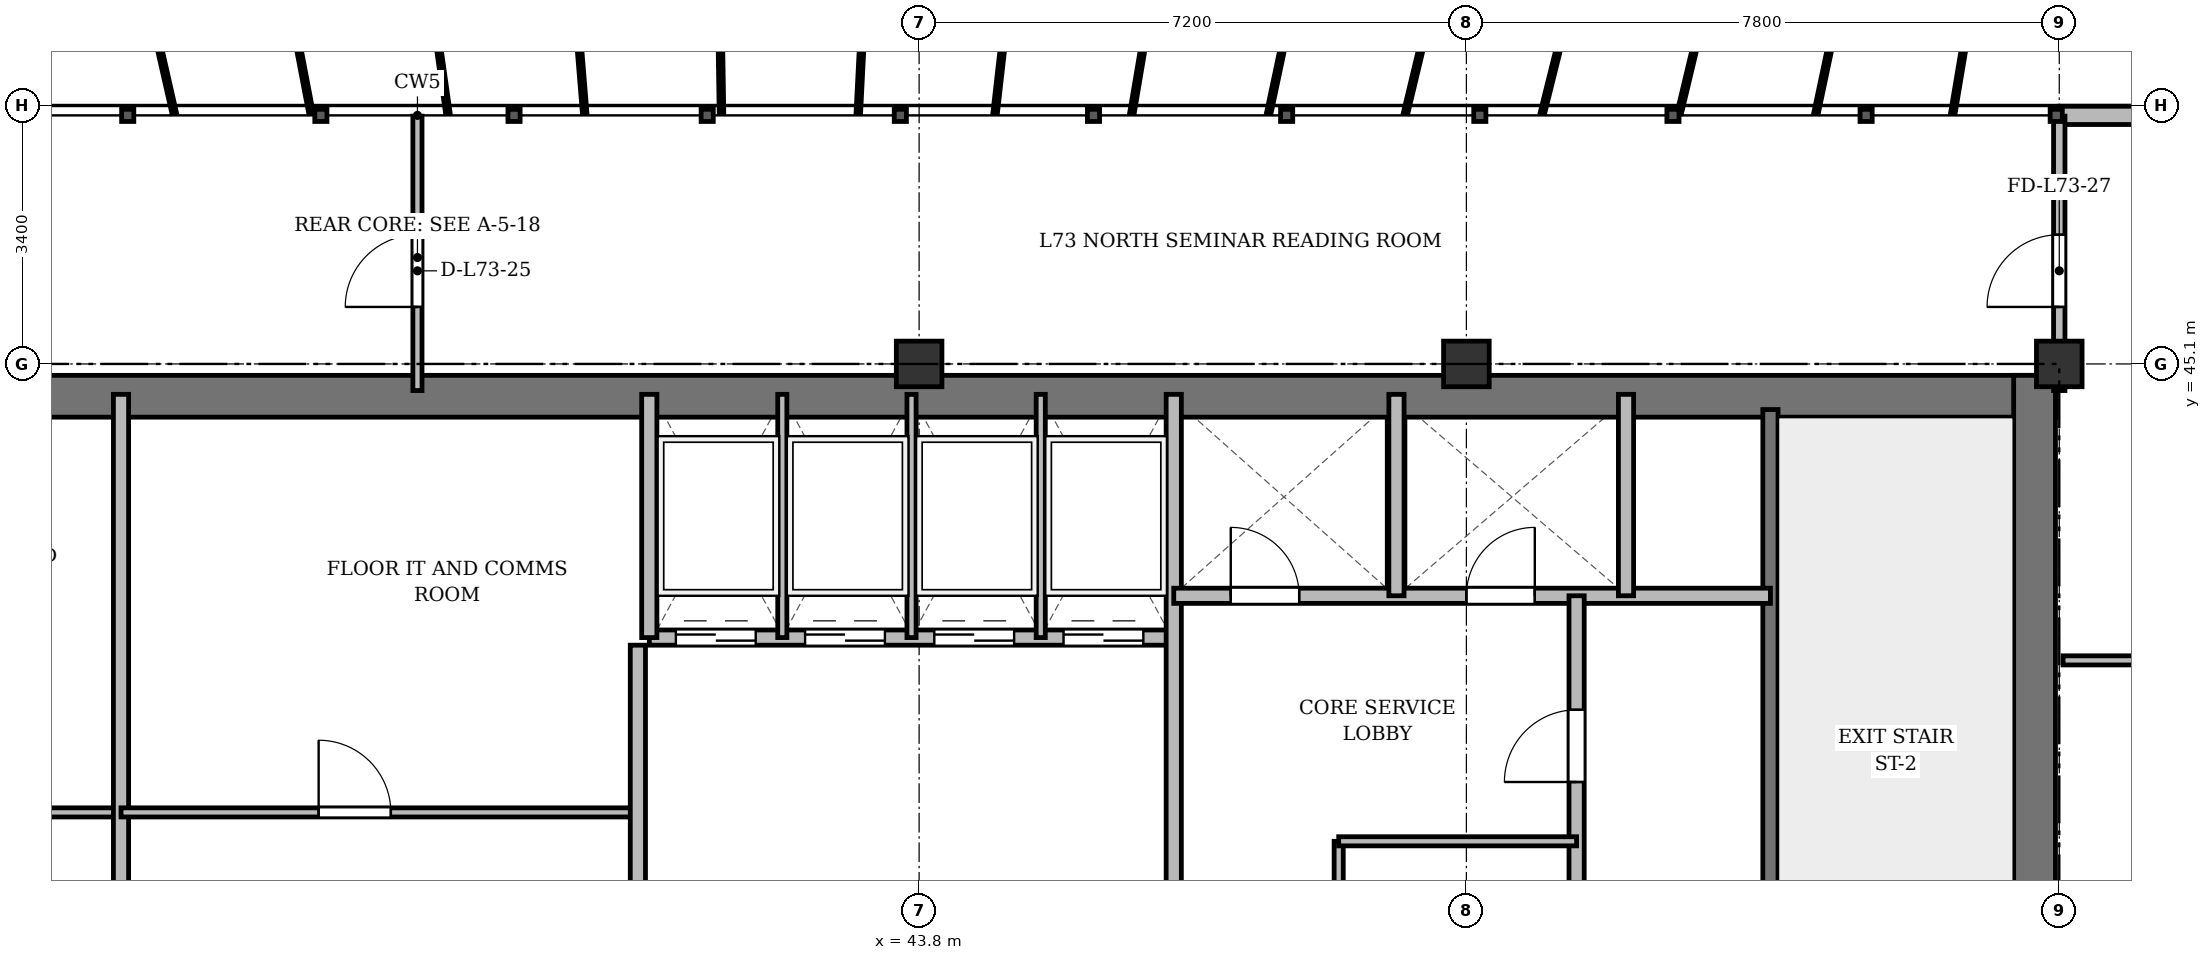
"""IFC4 building model, lengths in metres.
Left out: names, types, materials, properties, quantities, classifications, styles, units other than length and angle.
Written with IfcOpenShell. Run it as: python <this file> out.ifc"""

import sys

from ifc_helpers import new_model, si_unit, direction, frame, frame_2d, origin, origin_2d, place, context, subcontext, project, spatial, rectangle, extrude, source, transform, mapped, element, fill, save


model = new_model("IFC4")
c1 = context("Model", 3, precision=1e-05, world=origin(), true_north=direction((0.0, 1.0)))
c2 = subcontext(c1, "Body", "Model", "MODEL_VIEW")
j1 = project(units=[si_unit("LENGTHUNIT", "METRE"), si_unit("PLANEANGLEUNIT", "RADIAN")], contexts=[c1])
p1 = place(None, origin())
s1 = spatial("IfcSite", under=j1, at=p1, CompositionType="ELEMENT")
p2 = place(p1, origin())
s2 = spatial("IfcBuilding", under=s1, at=p2, CompositionType="ELEMENT")
p3 = place(p2, frame((0.0, 0.0, 281.1)))
s3 = spatial("IfcBuildingStorey", under=s2, at=p3, CompositionType="ELEMENT", Elevation=281.1)
m1 = source(origin(), c2, "Body", "SweptSolid", [
    extrude(rectangle(XDim=0.6, YDim=0.6, at=origin_2d()), origin(), (0.0, 0.0, 1.0), 3.6),
])
for number, where, z_axis, x_axis in (
    (1, (43.8, 45.1, 0.0), (0.0, 0.0, 1.0), (1.0, 0.0, 0.0)),
    (2, (51.0, 45.1, 0.0), (0.0, 0.0, 1.0), (1.0, 0.0, 0.0)),
    (3, (58.8, 45.1, 0.0), (0.0, 0.0, 1.0), (1.0, 0.0, 0.0)),
):
    element("IfcColumn", number, at=place(p3, frame(where, z_axis=z_axis, x_axis=x_axis)), inside=s3, PredefinedType="COLUMN", context=c2, shape_type="MappedRepresentation", body=[
        mapped(m1, transform((0.0, 0.0, 0.0), x_axis=(1.0, 0.0, 0.0), y_axis=(0.0, 1.0, 0.0), z_axis=(0.0, 0.0, 1.0), scale=1.0)),
    ])
p4 = place(p3, frame((58.8, 48.37, 0.0), z_axis=(0.0, 0.0, 1.0), x_axis=(1.0, 0.0, 0.0)))
e4 = element("IfcWall", 4, at=p4, inside=s3, PredefinedType="SOLIDWALL", context=c2, shape_type="SweptSolid", body=[
    extrude(rectangle(XDim=4.3, YDim=0.24, at=frame_2d((2.15, 0.0))), origin(), (0.0, 0.0, 1.0), 3.37),
])
p5 = place(p4, frame((1.475, 0.0, 0.9)))
e5 = element("IfcOpeningElement", 5, at=p5, cuts=e4, PredefinedType="OPENING", context=c2, shape_type="SweptSolid", body=[
    extrude(rectangle(XDim=1.35, YDim=1.5, at=frame_2d((0.675, 0.75))), frame((0.0, 0.13, 0.0), z_axis=(0.0, -1.0, 0.0), x_axis=(1.0, 0.0, 0.0)), (0.0, 0.0, 1.0), 0.26),
])
p6 = place(p3, frame((15.65, 44.675, 0.0), z_axis=(0.0, 0.0, 1.0), x_axis=(1.0, 0.0, 0.0)))
e6 = element("IfcWall", 6, at=p6, inside=s3, PredefinedType="SHEAR", context=c2, shape_type="SweptSolid", body=[
    extrude(rectangle(XDim=43.1, YDim=0.55, at=frame_2d((21.55, 0.0))), origin(), (0.0, 0.0, 1.0), 3.37),
])
p7 = place(p3, frame((58.475, 33.4, 0.0), z_axis=(0.0, 0.0, 1.0), x_axis=(0.0, 1.0, 0.0)))
e7 = element("IfcWall", 7, at=p7, inside=s3, PredefinedType="SHEAR", context=c2, shape_type="SweptSolid", body=[
    extrude(rectangle(XDim=11.55, YDim=0.55, at=frame_2d((5.775, 0.0))), origin(), (0.0, 0.0, 1.0), 3.37),
])
p8 = place(p3, frame((55.0, 33.4, 0.0), z_axis=(0.0, 0.0, 1.0), x_axis=(0.0, 1.0, 0.0)))
e8 = element("IfcWall", 8, at=p8, inside=s3, PredefinedType="SHEAR", context=c2, shape_type="SweptSolid", body=[
    extrude(rectangle(XDim=11.1, YDim=0.2, at=frame_2d((5.55, 0.0))), origin(), (0.0, 0.0, 1.0), 3.37),
])
p9 = place(p8, frame((0.85, 0.0, 0.0)))
e9 = element("IfcOpeningElement", 9, at=p9, cuts=e8, PredefinedType="OPENING", context=c2, shape_type="SweptSolid", body=[
    extrude(rectangle(XDim=1.1, YDim=2.15, at=frame_2d((0.55, 1.075))), frame((0.0, 0.11, 0.0), z_axis=(0.0, -1.0, 0.0), x_axis=(1.0, 0.0, 0.0)), (0.0, 0.0, 1.0), 0.22),
])
p10 = place(p3, frame((26.3, 39.2, 0.0), z_axis=(0.0, 0.0, 1.0), x_axis=(1.0, 0.0, 0.0)))
e10 = element("IfcWall", 10, at=p10, inside=s3, PredefinedType="PARTITIONING", context=c2, shape_type="SweptSolid", body=[
    extrude(rectangle(XDim=7.0, YDim=0.12, at=frame_2d((3.5, 0.0))), origin(), (0.0, 0.0, 1.0), 2.87),
])
p11 = place(p10, frame((2.6, 0.0, 0.0)))
e11 = element("IfcOpeningElement", 11, at=p11, cuts=e10, PredefinedType="OPENING", context=c2, shape_type="SweptSolid", body=[
    extrude(rectangle(XDim=0.95, YDim=2.15, at=frame_2d((0.475, 1.075))), frame((0.0, 0.07, 0.0), z_axis=(0.0, -1.0, 0.0), x_axis=(1.0, 0.0, 0.0)), (0.0, 0.0, 1.0), 0.14),
])
p12 = place(p3, frame((33.3, 33.4, 0.0), z_axis=(0.0, 0.0, 1.0), x_axis=(0.0, 1.0, 0.0)))
e12 = element("IfcWall", 12, at=p12, inside=s3, PredefinedType="SOLIDWALL", context=c2, shape_type="SweptSolid", body=[
    extrude(rectangle(XDim=11.3, YDim=0.2, at=frame_2d((5.65, 0.0))), origin(), (0.0, 0.0, 1.0), 2.92),
])
p13 = place(p3, frame((33.3, 39.2, 0.0), z_axis=(0.0, 0.0, 1.0), x_axis=(1.0, 0.0, 0.0)))
e13 = element("IfcWall", 13, at=p13, inside=s3, PredefinedType="PARTITIONING", context=c2, shape_type="SweptSolid", body=[
    extrude(rectangle(XDim=6.8, YDim=0.12, at=frame_2d((3.4, 0.0))), origin(), (0.0, 0.0, 1.0), 3.37),
])
p14 = place(p13, frame((2.6, 0.0, 0.0)))
e14 = element("IfcOpeningElement", 14, at=p14, cuts=e13, PredefinedType="OPENING", context=c2, shape_type="SweptSolid", body=[
    extrude(rectangle(XDim=0.95, YDim=2.15, at=frame_2d((0.475, 1.075))), frame((0.0, 0.07, 0.0), z_axis=(0.0, -1.0, 0.0), x_axis=(1.0, 0.0, 0.0)), (0.0, 0.0, 1.0), 0.14),
])
p15 = place(p3, frame((40.1, 33.4, 0.0), z_axis=(0.0, 0.0, 1.0), x_axis=(0.0, 1.0, 0.0)))
e15 = element("IfcWall", 15, at=p15, inside=s3, PredefinedType="SOLIDWALL", context=c2, shape_type="SweptSolid", body=[
    extrude(rectangle(XDim=8.0, YDim=0.2, at=frame_2d((4.0, 0.0))), origin(), (0.0, 0.0, 1.0), 2.92),
])
p16 = place(p3, frame((40.25, 41.5, 0.0), z_axis=(0.0, 0.0, 1.0), x_axis=(1.0, 0.0, 0.0)))
e16 = element("IfcWall", 16, at=p16, inside=s3, PredefinedType="SOLIDWALL", context=c2, shape_type="SweptSolid", body=[
    extrude(rectangle(XDim=6.9, YDim=0.2, at=frame_2d((3.45, 0.0))), origin(), (0.0, 0.0, 1.0), 3.37),
])
p17 = place(p16, frame((0.35, 0.0, 0.0)))
e17 = element("IfcOpeningElement", 17, at=p17, cuts=e16, PredefinedType="OPENING", context=c2, shape_type="SweptSolid", body=[
    extrude(rectangle(XDim=1.05, YDim=2.15, at=frame_2d((0.525, 1.075))), frame((0.0, 0.11, 0.0), z_axis=(0.0, -1.0, 0.0), x_axis=(1.0, 0.0, 0.0)), (0.0, 0.0, 1.0), 0.22),
])
p18 = place(p16, frame((2.05, 0.0, 0.0)))
e18 = element("IfcOpeningElement", 18, at=p18, cuts=e16, PredefinedType="OPENING", context=c2, shape_type="SweptSolid", body=[
    extrude(rectangle(XDim=1.05, YDim=2.15, at=frame_2d((0.525, 1.075))), frame((0.0, 0.11, 0.0), z_axis=(0.0, -1.0, 0.0), x_axis=(1.0, 0.0, 0.0)), (0.0, 0.0, 1.0), 0.22),
])
p19 = place(p16, frame((3.75, 0.0, 0.0)))
e19 = element("IfcOpeningElement", 19, at=p19, cuts=e16, PredefinedType="OPENING", context=c2, shape_type="SweptSolid", body=[
    extrude(rectangle(XDim=1.05, YDim=2.15, at=frame_2d((0.525, 1.075))), frame((0.0, 0.11, 0.0), z_axis=(0.0, -1.0, 0.0), x_axis=(1.0, 0.0, 0.0)), (0.0, 0.0, 1.0), 0.22),
])
p20 = place(p16, frame((5.45, 0.0, 0.0)))
e20 = element("IfcOpeningElement", 20, at=p20, cuts=e16, PredefinedType="OPENING", context=c2, shape_type="SweptSolid", body=[
    extrude(rectangle(XDim=1.05, YDim=2.15, at=frame_2d((0.525, 1.075))), frame((0.0, 0.11, 0.0), z_axis=(0.0, -1.0, 0.0), x_axis=(1.0, 0.0, 0.0)), (0.0, 0.0, 1.0), 0.22),
])
p21 = place(p3, frame((40.25, 41.5, 0.0), z_axis=(0.0, 0.0, 1.0), x_axis=(0.0, 1.0, 0.0)))
e21 = element("IfcWall", 21, at=p21, inside=s3, PredefinedType="SOLIDWALL", context=c2, shape_type="SweptSolid", body=[
    extrude(rectangle(XDim=3.2, YDim=0.2, at=frame_2d((1.6, 0.0))), origin(), (0.0, 0.0, 1.0), 3.37),
])
for number, where, z_axis, x_axis in (
    (22, (42.0, 41.5, 0.0), (0.0, 0.0, 1.0), (0.0, 1.0, 0.0)),
    (23, (43.7, 41.5, 0.0), (0.0, 0.0, 1.0), (0.0, 1.0, 0.0)),
    (24, (45.4, 41.5, 0.0), (0.0, 0.0, 1.0), (0.0, 1.0, 0.0)),
):
    element("IfcWall", number, at=place(p3, frame(where, z_axis=z_axis, x_axis=x_axis)), inside=s3, PredefinedType="PARTITIONING", context=c2, shape_type="SweptSolid", body=[
        extrude(rectangle(XDim=3.2, YDim=0.12, at=frame_2d((1.6, 0.0))), origin(), (0.0, 0.0, 1.0), 3.37),
    ])
p22 = place(p3, frame((47.15, 33.4, 0.0), z_axis=(0.0, 0.0, 1.0), x_axis=(0.0, 1.0, 0.0)))
e25 = element("IfcWall", 25, at=p22, inside=s3, PredefinedType="SOLIDWALL", context=c2, shape_type="SweptSolid", body=[
    extrude(rectangle(XDim=11.3, YDim=0.2, at=frame_2d((5.65, 0.0))), origin(), (0.0, 0.0, 1.0), 2.92),
])
p23 = place(p3, frame((47.15, 42.05, 0.0), z_axis=(0.0, 0.0, 1.0), x_axis=(1.0, 0.0, 0.0)))
e26 = element("IfcWall", 26, at=p23, inside=s3, PredefinedType="SOLIDWALL", context=c2, shape_type="SweptSolid", body=[
    extrude(rectangle(XDim=7.85, YDim=0.2, at=frame_2d((3.925, 0.0))), origin(), (0.0, 0.0, 1.0), 2.87),
])
p24 = place(p23, frame((0.75, 0.0, 0.0)))
e27 = element("IfcOpeningElement", 27, at=p24, cuts=e26, PredefinedType="OPENING", context=c2, shape_type="SweptSolid", body=[
    extrude(rectangle(XDim=0.9, YDim=2.1, at=frame_2d((0.45, 1.05))), frame((0.0, 0.11, 0.0), z_axis=(0.0, -1.0, 0.0), x_axis=(1.0, 0.0, 0.0)), (0.0, 0.0, 1.0), 0.22),
])
p25 = place(p23, frame((3.85, 0.0, 0.0)))
e28 = element("IfcOpeningElement", 28, at=p25, cuts=e26, PredefinedType="OPENING", context=c2, shape_type="SweptSolid", body=[
    extrude(rectangle(XDim=0.9, YDim=2.1, at=frame_2d((0.45, 1.05))), frame((0.0, 0.11, 0.0), z_axis=(0.0, -1.0, 0.0), x_axis=(1.0, 0.0, 0.0)), (0.0, 0.0, 1.0), 0.22),
])
for number, where, z_axis, x_axis in (
    (29, (50.08, 42.05, 0.0), (0.0, 0.0, 1.0), (0.0, 1.0, 0.0)),
    (30, (53.1, 42.05, 0.0), (0.0, 0.0, 1.0), (0.0, 1.0, 0.0)),
):
    element("IfcWall", number, at=place(p3, frame(where, z_axis=z_axis, x_axis=x_axis)), inside=s3, PredefinedType="SOLIDWALL", context=c2, shape_type="SweptSolid", body=[
        extrude(rectangle(XDim=2.65, YDim=0.2, at=frame_2d((1.325, 0.0))), origin(), (0.0, 0.0, 1.0), 3.37),
    ])
p26 = place(p3, frame((52.45, 33.4, 0.0), z_axis=(0.0, 0.0, 1.0), x_axis=(0.0, 1.0, 0.0)))
e31 = element("IfcWall", 31, at=p26, inside=s3, PredefinedType="PARTITIONING", context=c2, shape_type="SweptSolid", body=[
    extrude(rectangle(XDim=8.65, YDim=0.2, at=frame_2d((4.325, 0.0))), origin(), (0.0, 0.0, 1.0), 2.92),
])
p27 = place(p26, frame((6.2, 0.0, 0.0)))
e32 = element("IfcOpeningElement", 32, at=p27, cuts=e31, PredefinedType="OPENING", context=c2, shape_type="SweptSolid", body=[
    extrude(rectangle(XDim=0.95, YDim=2.15, at=frame_2d((0.475, 1.075))), frame((0.0, 0.11, 0.0), z_axis=(0.0, -1.0, 0.0), x_axis=(1.0, 0.0, 0.0)), (0.0, 0.0, 1.0), 0.22),
])
p28 = place(p3, frame((49.32, 33.4, 0.0), z_axis=(0.0, 0.0, 1.0), x_axis=(0.0, 1.0, 0.0)))
e33 = element("IfcWall", 33, at=p28, inside=s3, PredefinedType="PARTITIONING", context=c2, shape_type="SweptSolid", body=[
    extrude(rectangle(XDim=5.42, YDim=0.12, at=frame_2d((2.71, 0.0))), origin(), (0.0, 0.0, 1.0), 2.92),
])
p29 = place(p28, frame((1.6, 0.0, 0.0)))
e34 = element("IfcOpeningElement", 34, at=p29, cuts=e33, PredefinedType="OPENING", context=c2, shape_type="SweptSolid", body=[
    extrude(rectangle(XDim=0.95, YDim=2.15, at=frame_2d((0.475, 1.075))), frame((0.0, 0.07, 0.0), z_axis=(0.0, -1.0, 0.0), x_axis=(1.0, 0.0, 0.0)), (0.0, 0.0, 1.0), 0.14),
])
p30 = place(p3, frame((49.32, 38.82, 0.0), z_axis=(0.0, 0.0, 1.0), x_axis=(1.0, 0.0, 0.0)))
e35 = element("IfcWall", 35, at=p30, inside=s3, PredefinedType="PARTITIONING", context=c2, shape_type="SweptSolid", body=[
    extrude(rectangle(XDim=3.13, YDim=0.12, at=frame_2d((1.565, 0.0))), origin(), (0.0, 0.0, 1.0), 2.87),
])
p31 = place(p3, frame((58.85, 41.2, 0.0), z_axis=(0.0, 0.0, 1.0), x_axis=(1.0, 0.0, 0.0)))
e36 = element("IfcWall", 36, at=p31, inside=s3, PredefinedType="PARTITIONING", context=c2, shape_type="SweptSolid", body=[
    extrude(rectangle(XDim=7.05, YDim=0.12, at=frame_2d((3.525, 0.0))), origin(), (0.0, 0.0, 1.0), 2.87),
])
p32 = place(p31, frame((2.958, 0.0, 0.0)))
e37 = element("IfcOpeningElement", 37, at=p32, cuts=e36, PredefinedType="OPENING", context=c2, shape_type="SweptSolid", body=[
    extrude(rectangle(XDim=0.95, YDim=2.15, at=frame_2d((0.475, 1.075))), frame((0.0, 0.07, 0.0), z_axis=(0.0, -1.0, 0.0), x_axis=(1.0, 0.0, 0.0)), (0.0, 0.0, 1.0), 0.14),
])
p33 = place(p3, frame((37.2, 44.75, 0.0), z_axis=(0.0, 0.0, 1.0), x_axis=(0.0, 1.0, 0.0)))
e38 = element("IfcWall", 38, at=p33, inside=s3, PredefinedType="PARTITIONING", context=c2, shape_type="SweptSolid", body=[
    extrude(rectangle(XDim=3.61, YDim=0.12, at=frame_2d((1.805, 0.0))), origin(), (0.0, 0.0, 1.0), 2.92),
])
p34 = place(p33, frame((1.1, 0.0, 0.0)))
e39 = element("IfcOpeningElement", 39, at=p34, cuts=e38, PredefinedType="OPENING", context=c2, shape_type="SweptSolid", body=[
    extrude(rectangle(XDim=0.95, YDim=2.15, at=frame_2d((0.475, 1.075))), frame((0.0, 0.07, 0.0), z_axis=(0.0, -1.0, 0.0), x_axis=(1.0, 0.0, 0.0)), (0.0, 0.0, 1.0), 0.14),
])
p35 = place(p3, frame((58.8, 44.75, 0.0), z_axis=(0.0, 0.0, 1.0), x_axis=(0.0, 1.0, 0.0)))
e40 = element("IfcWall", 40, at=p35, inside=s3, PredefinedType="PARTITIONING", context=c2, shape_type="SweptSolid", body=[
    extrude(rectangle(XDim=3.61, YDim=0.15, at=frame_2d((1.805, 0.0))), origin(), (0.0, 0.0, 1.0), 2.87),
])
p36 = place(p35, frame((1.1, 0.0, 0.0)))
e41 = element("IfcOpeningElement", 41, at=p36, cuts=e40, PredefinedType="OPENING", context=c2, shape_type="SweptSolid", body=[
    extrude(rectangle(XDim=0.95, YDim=2.15, at=frame_2d((0.475, 1.075))), frame((0.0, 0.085, 0.0), z_axis=(0.0, -1.0, 0.0), x_axis=(1.0, 0.0, 0.0)), (0.0, 0.0, 1.0), 0.17),
])
m2 = source(origin(), c2, "Body", "SweptSolid", [
    extrude(rectangle(XDim=0.95, YDim=2.15, at=frame_2d((0.475, 1.075))), frame((0.0, 0.025, 0.0), z_axis=(0.0, -1.0, 0.0), x_axis=(1.0, 0.0, 0.0)), (0.0, 0.0, 1.0), 0.05),
])
p37 = place(p14, origin())
e42 = element("IfcDoor", 42, at=p37, inside=s3, OperationType="SINGLE_SWING_LEFT", PredefinedType="DOOR", context=c2, shape_type="MappedRepresentation", body=[
    mapped(m2, transform((0.0, 0.0, 0.0), x_axis=(1.0, 0.0, 0.0), y_axis=(0.0, 1.0, 0.0), z_axis=(0.0, 0.0, 1.0), scale=1.0)),
])
fill(e14, e42)
m3 = source(origin(), c2, "Body", "SweptSolid", [
    extrude(rectangle(XDim=1.05, YDim=2.15, at=frame_2d((0.525, 1.075))), frame((0.0, 0.025, 0.0), z_axis=(0.0, -1.0, 0.0), x_axis=(1.0, 0.0, 0.0)), (0.0, 0.0, 1.0), 0.05),
])
p38 = place(p17, origin())
e43 = element("IfcDoor", 43, at=p38, inside=s3, OperationType="DOUBLE_DOOR_SLIDING", PredefinedType="DOOR", context=c2, shape_type="MappedRepresentation", body=[
    mapped(m3, transform((0.0, 0.0, 0.0), x_axis=(1.0, 0.0, 0.0), y_axis=(0.0, 1.0, 0.0), z_axis=(0.0, 0.0, 1.0), scale=1.0)),
])
fill(e17, e43)
p39 = place(p18, origin())
e44 = element("IfcDoor", 44, at=p39, inside=s3, OperationType="DOUBLE_DOOR_SLIDING", PredefinedType="DOOR", context=c2, shape_type="MappedRepresentation", body=[
    mapped(m3, transform((0.0, 0.0, 0.0), x_axis=(1.0, 0.0, 0.0), y_axis=(0.0, 1.0, 0.0), z_axis=(0.0, 0.0, 1.0), scale=1.0)),
])
fill(e18, e44)
p40 = place(p19, origin())
e45 = element("IfcDoor", 45, at=p40, inside=s3, OperationType="DOUBLE_DOOR_SLIDING", PredefinedType="DOOR", context=c2, shape_type="MappedRepresentation", body=[
    mapped(m3, transform((0.0, 0.0, 0.0), x_axis=(1.0, 0.0, 0.0), y_axis=(0.0, 1.0, 0.0), z_axis=(0.0, 0.0, 1.0), scale=1.0)),
])
fill(e19, e45)
p41 = place(p20, origin())
e46 = element("IfcDoor", 46, at=p41, inside=s3, OperationType="DOUBLE_DOOR_SLIDING", PredefinedType="DOOR", context=c2, shape_type="MappedRepresentation", body=[
    mapped(m3, transform((0.0, 0.0, 0.0), x_axis=(1.0, 0.0, 0.0), y_axis=(0.0, 1.0, 0.0), z_axis=(0.0, 0.0, 1.0), scale=1.0)),
])
fill(e20, e46)
m4 = source(origin(), c2, "Body", "SweptSolid", [
    extrude(rectangle(XDim=0.9, YDim=2.1, at=frame_2d((0.45, 1.05))), frame((0.0, 0.025, 0.0), z_axis=(0.0, -1.0, 0.0), x_axis=(1.0, 0.0, 0.0)), (0.0, 0.0, 1.0), 0.05),
])
p42 = place(p24, origin())
e47 = element("IfcDoor", 47, at=p42, inside=s3, OperationType="SINGLE_SWING_LEFT", PredefinedType="DOOR", context=c2, shape_type="MappedRepresentation", body=[
    mapped(m4, transform((0.0, 0.0, 0.0), x_axis=(1.0, 0.0, 0.0), y_axis=(0.0, 1.0, 0.0), z_axis=(0.0, 0.0, 1.0), scale=1.0)),
])
fill(e27, e47)
p43 = place(p25, origin())
e48 = element("IfcDoor", 48, at=p43, inside=s3, OperationType="SINGLE_SWING_RIGHT", PredefinedType="DOOR", context=c2, shape_type="MappedRepresentation", body=[
    mapped(m4, transform((0.0, 0.0, 0.0), x_axis=(1.0, 0.0, 0.0), y_axis=(0.0, 1.0, 0.0), z_axis=(0.0, 0.0, 1.0), scale=1.0)),
])
fill(e28, e48)
p44 = place(p27, origin())
e49 = element("IfcDoor", 49, at=p44, inside=s3, OperationType="SINGLE_SWING_LEFT", PredefinedType="DOOR", context=c2, shape_type="MappedRepresentation", body=[
    mapped(m2, transform((0.0, 0.0, 0.0), x_axis=(1.0, 0.0, 0.0), y_axis=(0.0, 1.0, 0.0), z_axis=(0.0, 0.0, 1.0), scale=1.0)),
])
fill(e32, e49)
p45 = place(p34, origin())
e50 = element("IfcDoor", 50, at=p45, inside=s3, OperationType="SINGLE_SWING_LEFT", PredefinedType="DOOR", context=c2, shape_type="MappedRepresentation", body=[
    mapped(m2, transform((0.0, 0.0, 0.0), x_axis=(1.0, 0.0, 0.0), y_axis=(0.0, 1.0, 0.0), z_axis=(0.0, 0.0, 1.0), scale=1.0)),
])
fill(e39, e50)
p46 = place(p36, origin())
e51 = element("IfcDoor", 51, at=p46, inside=s3, OperationType="SINGLE_SWING_LEFT", PredefinedType="DOOR", context=c2, shape_type="MappedRepresentation", body=[
    mapped(m2, transform((0.0, 0.0, 0.0), x_axis=(1.0, 0.0, 0.0), y_axis=(0.0, 1.0, 0.0), z_axis=(0.0, 0.0, 1.0), scale=1.0)),
])
fill(e41, e51)
save(model, sys.argv[1])
